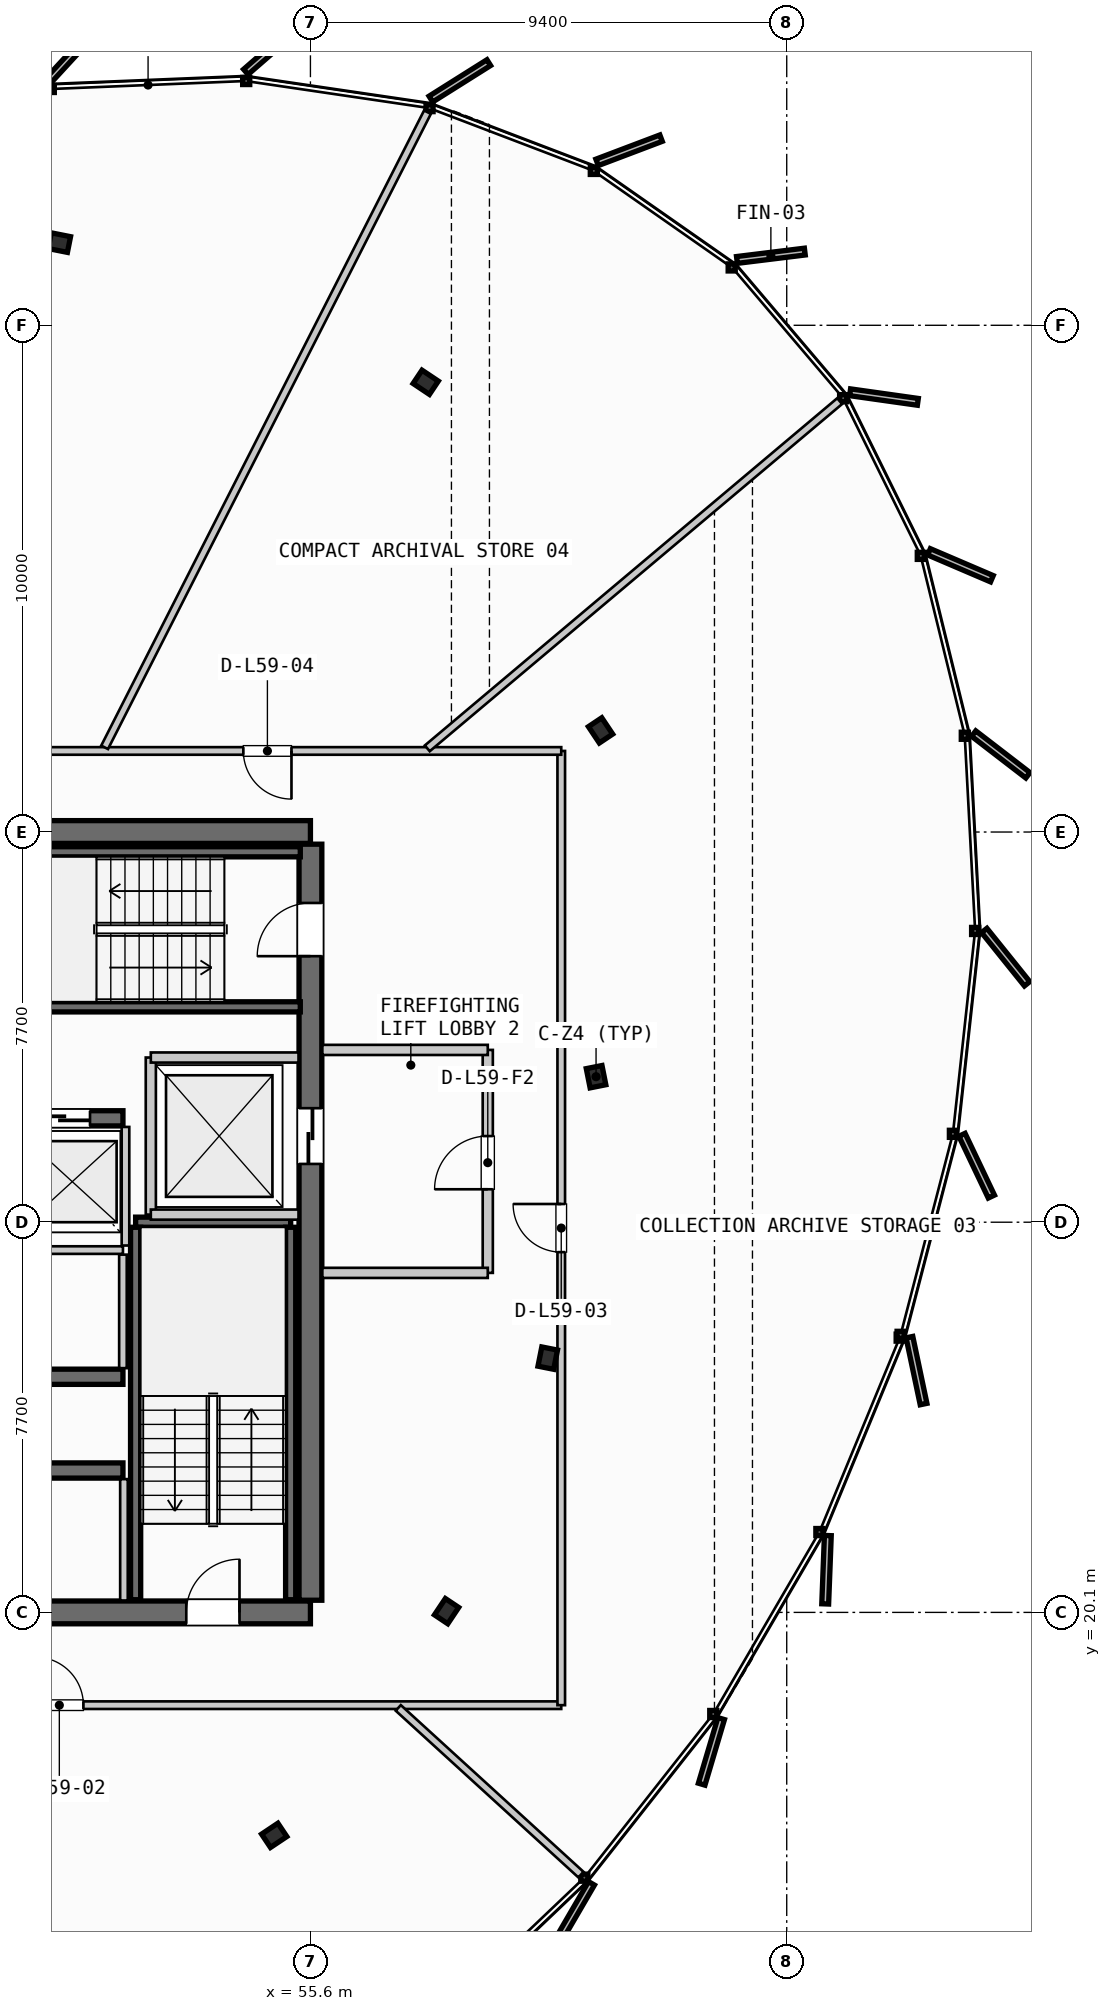
"""IFC4 building model, lengths in metres.
Left out: names, types, materials, properties, quantities, classifications, styles, units other than length and angle.
Written with IfcOpenShell. Run it as: python <this file> out.ifc"""

import sys

from ifc_helpers import new_model, si_unit, direction, frame, frame_2d, origin, origin_2d, place, context, subcontext, project, spatial, rectangle, i_section, extrude, source, transform, mapped, element, fill, save


model = new_model("IFC4")
c1 = context("Model", 3, precision=1e-05, world=origin(), true_north=direction((0.0, 1.0)))
c2 = subcontext(c1, "Body", "Model", "MODEL_VIEW")
j1 = project(units=[si_unit("LENGTHUNIT", "METRE"), si_unit("PLANEANGLEUNIT", "RADIAN")], contexts=[c1])
p1 = place(None, origin())
s1 = spatial("IfcSite", under=j1, at=p1, CompositionType="ELEMENT")
p2 = place(p1, origin())
s2 = spatial("IfcBuilding", under=s1, at=p2, CompositionType="ELEMENT")
p3 = place(p2, frame((0.0, 0.0, 228.4)))
s3 = spatial("IfcBuildingStorey", under=s2, at=p3, CompositionType="ELEMENT", Elevation=228.4)
p4 = place(p3, frame((38.0, 20.1, 0.0), z_axis=(0.0, 0.0, 1.0), x_axis=(1.0, 0.0, 0.0)))
e1 = element("IfcWall", 1, at=p4, inside=s3, PredefinedType="SHEAR", context=c2, shape_type="SweptSolid", body=[
    extrude(rectangle(XDim=17.6, YDim=0.45, at=frame_2d((8.8, 0.0))), origin(), (0.0, 0.0, 1.0), 3.21),
])
p5 = place(p4, frame((1.4, 0.0, 0.0)))
e2 = element("IfcOpeningElement", 2, at=p5, cuts=e1, PredefinedType="OPENING", context=c2, shape_type="SweptSolid", body=[
    extrude(rectangle(XDim=1.05, YDim=2.15, at=frame_2d((0.525, 1.075))), frame((0.0, 0.235, 0.0), z_axis=(0.0, -1.0, 0.0), x_axis=(1.0, 0.0, 0.0)), (0.0, 0.0, 1.0), 0.47),
])
p6 = place(p4, frame((15.15, 0.0, 0.0)))
e3 = element("IfcOpeningElement", 3, at=p6, cuts=e1, PredefinedType="OPENING", context=c2, shape_type="SweptSolid", body=[
    extrude(rectangle(XDim=1.05, YDim=2.15, at=frame_2d((0.525, 1.075))), frame((0.0, 0.235, 0.0), z_axis=(0.0, -1.0, 0.0), x_axis=(1.0, 0.0, 0.0)), (0.0, 0.0, 1.0), 0.47),
])
p7 = place(p4, frame((5.25, 0.0, 0.0)))
e4 = element("IfcOpeningElement", 4, at=p7, cuts=e1, PredefinedType="OPENING", context=c2, shape_type="SweptSolid", body=[
    extrude(rectangle(XDim=0.95, YDim=2.15, at=frame_2d((0.475, 1.075))), frame((0.0, 0.235, 0.0), z_axis=(0.0, -1.0, 0.0), x_axis=(1.0, 0.0, 0.0)), (0.0, 0.0, 1.0), 0.47),
])
p8 = place(p4, frame((11.4, 0.0, 0.0)))
e5 = element("IfcOpeningElement", 5, at=p8, cuts=e1, PredefinedType="OPENING", context=c2, shape_type="SweptSolid", body=[
    extrude(rectangle(XDim=0.95, YDim=2.15, at=frame_2d((0.475, 1.075))), frame((0.0, 0.235, 0.0), z_axis=(0.0, -1.0, 0.0), x_axis=(1.0, 0.0, 0.0)), (0.0, 0.0, 1.0), 0.47),
])
p9 = place(p3, frame((55.6, 35.5, 0.0), z_axis=(0.0, 0.0, 1.0), x_axis=(-1.0, 0.0, 0.0)))
e6 = element("IfcWall", 6, at=p9, inside=s3, PredefinedType="SHEAR", context=c2, shape_type="SweptSolid", body=[
    extrude(rectangle(XDim=17.6, YDim=0.45, at=frame_2d((8.8, 0.0))), origin(), (0.0, 0.0, 1.0), 3.21),
])
p10 = place(p9, frame((8.05, 0.0, 0.0)))
e7 = element("IfcOpeningElement", 7, at=p10, cuts=e6, PredefinedType="OPENING", context=c2, shape_type="SweptSolid", body=[
    extrude(rectangle(XDim=1.5, YDim=2.2, at=frame_2d((0.75, 1.1))), frame((0.0, 0.235, 0.0), z_axis=(0.0, -1.0, 0.0), x_axis=(1.0, 0.0, 0.0)), (0.0, 0.0, 1.0), 0.47),
])
p11 = place(p9, frame((15.1, 0.0, 0.0)))
e8 = element("IfcOpeningElement", 8, at=p11, cuts=e6, PredefinedType="OPENING", context=c2, shape_type="SweptSolid", body=[
    extrude(rectangle(XDim=0.95, YDim=2.15, at=frame_2d((0.475, 1.075))), frame((0.0, 0.235, 0.0), z_axis=(0.0, -1.0, 0.0), x_axis=(1.0, 0.0, 0.0)), (0.0, 0.0, 1.0), 0.47),
])
p12 = place(p9, frame((12.6, 0.0, 0.0)))
e9 = element("IfcOpeningElement", 9, at=p12, cuts=e6, PredefinedType="OPENING", context=c2, shape_type="SweptSolid", body=[
    extrude(rectangle(XDim=0.95, YDim=2.15, at=frame_2d((0.475, 1.075))), frame((0.0, 0.235, 0.0), z_axis=(0.0, -1.0, 0.0), x_axis=(1.0, 0.0, 0.0)), (0.0, 0.0, 1.0), 0.47),
])
p13 = place(p9, frame((10.45, 0.0, 0.0)))
e10 = element("IfcOpeningElement", 10, at=p13, cuts=e6, PredefinedType="OPENING", context=c2, shape_type="SweptSolid", body=[
    extrude(rectangle(XDim=0.95, YDim=2.15, at=frame_2d((0.475, 1.075))), frame((0.0, 0.235, 0.0), z_axis=(0.0, -1.0, 0.0), x_axis=(1.0, 0.0, 0.0)), (0.0, 0.0, 1.0), 0.47),
])
p14 = place(p3, frame((55.6, 20.34, 0.0), z_axis=(0.0, 0.0, 1.0), x_axis=(0.0, 1.0, 0.0)))
e11 = element("IfcWall", 11, at=p14, inside=s3, PredefinedType="SHEAR", context=c2, shape_type="SweptSolid", body=[
    extrude(rectangle(XDim=14.92, YDim=0.45, at=frame_2d((7.46, 0.0))), origin(), (0.0, 0.0, 1.0), 3.21),
])
p15 = place(p14, frame((12.71, 0.0, 0.0)))
e12 = element("IfcOpeningElement", 12, at=p15, cuts=e11, PredefinedType="OPENING", context=c2, shape_type="SweptSolid", body=[
    extrude(rectangle(XDim=1.05, YDim=2.15, at=frame_2d((0.525, 1.075))), frame((0.0, 0.235, 0.0), z_axis=(0.0, -1.0, 0.0), x_axis=(1.0, 0.0, 0.0)), (0.0, 0.0, 1.0), 0.47),
])
p16 = place(p14, frame((8.61, 0.0, 0.0)))
e13 = element("IfcOpeningElement", 13, at=p16, cuts=e11, PredefinedType="OPENING", context=c2, shape_type="SweptSolid", body=[
    extrude(rectangle(XDim=1.1, YDim=2.2, at=frame_2d((0.55, 1.1))), frame((0.0, 0.235, 0.0), z_axis=(0.0, -1.0, 0.0), x_axis=(1.0, 0.0, 0.0)), (0.0, 0.0, 1.0), 0.47),
])
p17 = place(p3, frame((47.65, 22.9, 0.0), z_axis=(0.0, 0.0, 1.0), x_axis=(1.0, 0.0, 0.0)))
e14 = element("IfcWall", 14, at=p17, inside=s3, PredefinedType="SHEAR", context=c2, shape_type="SweptSolid", body=[
    extrude(rectangle(XDim=4.25, YDim=0.3, at=frame_2d((2.125, 0.0))), origin(), (0.0, 0.0, 1.0), 3.21),
])
p18 = place(p3, frame((47.65, 24.75, 0.0), z_axis=(0.0, 0.0, 1.0), x_axis=(1.0, 0.0, 0.0)))
e15 = element("IfcWall", 15, at=p18, inside=s3, PredefinedType="SHEAR", context=c2, shape_type="SweptSolid", body=[
    extrude(rectangle(XDim=4.25, YDim=0.3, at=frame_2d((2.125, 0.0))), origin(), (0.0, 0.0, 1.0), 3.21),
])
p19 = place(p18, frame((1.55, 0.0, 0.0)))
e16 = element("IfcOpeningElement", 16, at=p19, cuts=e15, PredefinedType="OPENING", context=c2, shape_type="SweptSolid", body=[
    extrude(rectangle(XDim=0.95, YDim=2.15, at=frame_2d((0.475, 1.075))), frame((0.0, 0.16, 0.0), z_axis=(0.0, -1.0, 0.0), x_axis=(1.0, 0.0, 0.0)), (0.0, 0.0, 1.0), 0.32),
])
p20 = place(p3, frame((47.65, 29.85, 0.0), z_axis=(0.0, 0.0, 1.0), x_axis=(1.0, 0.0, 0.0)))
e17 = element("IfcWall", 17, at=p20, inside=s3, PredefinedType="SHEAR", context=c2, shape_type="SweptSolid", body=[
    extrude(rectangle(XDim=4.25, YDim=0.3, at=frame_2d((2.125, 0.0))), origin(), (0.0, 0.0, 1.0), 3.21),
])
p21 = place(p20, frame((0.45, 0.0, 0.0)))
e18 = element("IfcOpeningElement", 18, at=p21, cuts=e17, PredefinedType="OPENING", context=c2, shape_type="SweptSolid", body=[
    extrude(rectangle(XDim=1.1, YDim=2.2, at=frame_2d((0.55, 1.1))), frame((0.0, 0.16, 0.0), z_axis=(0.0, -1.0, 0.0), x_axis=(1.0, 0.0, 0.0)), (0.0, 0.0, 1.0), 0.32),
])
p22 = place(p20, frame((2.5, 0.0, 0.0)))
e19 = element("IfcOpeningElement", 19, at=p22, cuts=e17, PredefinedType="OPENING", context=c2, shape_type="SweptSolid", body=[
    extrude(rectangle(XDim=1.1, YDim=2.2, at=frame_2d((0.55, 1.1))), frame((0.0, 0.16, 0.0), z_axis=(0.0, -1.0, 0.0), x_axis=(1.0, 0.0, 0.0)), (0.0, 0.0, 1.0), 0.32),
])
m1 = source(origin(), c2, "Body", "SweptSolid", [
    extrude(i_section(OverallWidth=0.387, OverallDepth=0.316, WebThickness=0.019, FlangeThickness=0.028, FilletRadius=0.015, at=origin_2d()), origin(), (0.0, 0.0, 1.0), 3.21),
])
for number, where, z_axis, x_axis in (
    (20, (61.237, 30.672, 0.0), (0.0, 0.0, 1.0), (0.981, 0.195, 0.0)),
    (21, (61.326, 37.506, 0.0), (0.0, 0.0, 1.0), (0.831, 0.556, 0.0)),
    (22, (57.875, 44.375, 0.0), (0.0, 0.0, 1.0), (0.556, 0.831, 0.0)),
    (23, (50.645, 47.132, 0.0), (0.0, 0.0, 1.0), (0.195, 0.981, 0.0)),
    (24, (54.885, 15.7, 0.0), (0.0, 0.0, 1.0), (0.556, -0.831, 0.0)),
    (25, (58.287, 20.125, 0.0), (0.0, 0.0, 1.0), (0.831, -0.556, 0.0)),
    (26, (60.284, 25.118, 0.0), (0.0, 0.0, 1.0), (0.981, -0.195, 0.0)),
):
    element("IfcColumn", number, at=place(p3, frame(where, z_axis=z_axis, x_axis=x_axis)), inside=s3, PredefinedType="COLUMN", context=c2, shape_type="MappedRepresentation", body=[
        mapped(m1, transform((0.0, 0.0, 0.0), scale=1.0)),
    ])
p23 = place(p3, frame((52.15, 27.8, 0.0), z_axis=(0.0, 0.0, 1.0), x_axis=(1.0, 0.0, 0.0)))
e27 = element("IfcWall", 27, at=p23, inside=s3, PredefinedType="SHEAR", context=c2, shape_type="SweptSolid", body=[
    extrude(rectangle(XDim=3.06, YDim=0.2, at=frame_2d((1.53, 0.0))), origin(), (0.0, 0.0, 1.0), 3.21),
])
for number, where, z_axis, x_axis in (
    (28, (55.21, 27.7, 0.0), (0.0, 0.0, 1.0), (0.0, -1.0, 0.0)),
    (29, (52.15, 20.35, 0.0), (0.0, 0.0, 1.0), (0.0, 1.0, 0.0)),
    (30, (48.05, 35.11, 0.0), (0.0, 0.0, 1.0), (1.0, 0.0, 0.0)),
    (31, (55.4, 32.05, 0.0), (0.0, 0.0, 1.0), (-1.0, 0.0, 0.0)),
):
    element("IfcWall", number, at=place(p3, frame(where, z_axis=z_axis, x_axis=x_axis)), inside=s3, PredefinedType="SHEAR", context=c2, shape_type="SweptSolid", body=[
        extrude(rectangle(XDim=7.35, YDim=0.2, at=frame_2d((3.675, 0.0))), origin(), (0.0, 0.0, 1.0), 3.21),
    ])
p24 = place(p3, frame((52.45, 27.95, 0.0), z_axis=(0.0, 0.0, 1.0), x_axis=(0.0, 1.0, 0.0)))
e32 = element("IfcWall", 32, at=p24, inside=s3, PredefinedType="PARTITIONING", context=c2, shape_type="SweptSolid", body=[
    extrude(rectangle(XDim=3.1, YDim=0.2, at=frame_2d((1.55, 0.0))), origin(), (0.0, 0.0, 1.0), 2.28),
])
for number, where, z_axis, x_axis in (
    (33, (52.45, 27.95, 0.0), (0.0, 0.0, 1.0), (1.0, 0.0, 0.0)),
    (34, (52.45, 31.05, 0.0), (0.0, 0.0, 1.0), (1.0, 0.0, 0.0)),
):
    element("IfcWall", number, at=place(p3, frame(where, z_axis=z_axis, x_axis=x_axis)), inside=s3, PredefinedType="PARTITIONING", context=c2, shape_type="SweptSolid", body=[
        extrude(rectangle(XDim=2.915, YDim=0.2, at=frame_2d((1.458, 0.0))), origin(), (0.0, 0.0, 1.0), 2.28),
    ])
p25 = place(p3, frame((59.1, 26.8, 0.0), z_axis=(0.0, 0.0, 1.0), x_axis=(0.0, 1.0, 0.0)))
e35 = element("IfcWall", 35, at=p25, inside=s3, PredefinedType="PARTITIONING", context=c2, shape_type="SweptSolid", body=[
    extrude(rectangle(XDim=4.4, YDim=0.2, at=frame_2d((2.2, 0.0))), origin(), (0.0, 0.0, 1.0), 2.28),
])
p26 = place(p25, frame((1.65, 0.0, 0.0)))
e36 = element("IfcOpeningElement", 36, at=p26, cuts=e35, PredefinedType="OPENING", context=c2, shape_type="SweptSolid", body=[
    extrude(rectangle(XDim=1.05, YDim=2.15, at=frame_2d((0.525, 1.075))), frame((0.0, 0.11, 0.0), z_axis=(0.0, -1.0, 0.0), x_axis=(1.0, 0.0, 0.0)), (0.0, 0.0, 1.0), 0.22),
])
for number, where, z_axis, x_axis in (
    (37, (55.835, 26.8, 0.0), (0.0, 0.0, 1.0), (1.0, 0.0, 0.0)),
    (38, (55.835, 31.2, 0.0), (0.0, 0.0, 1.0), (1.0, 0.0, 0.0)),
):
    element("IfcWall", number, at=place(p3, frame(where, z_axis=z_axis, x_axis=x_axis)), inside=s3, PredefinedType="PARTITIONING", context=c2, shape_type="SweptSolid", body=[
        extrude(rectangle(XDim=3.265, YDim=0.2, at=frame_2d((1.633, 0.0))), origin(), (0.0, 0.0, 1.0), 2.28),
    ])
p27 = place(p3, frame((51.92, 20.335, 0.0), z_axis=(0.0, 0.0, 1.0), x_axis=(0.0, 1.0, 0.0)))
e39 = element("IfcWall", 39, at=p27, inside=s3, PredefinedType="PARTITIONING", context=c2, shape_type="SweptSolid", body=[
    extrude(rectangle(XDim=2.395, YDim=0.15, at=frame_2d((1.198, 0.0))), origin(), (0.0, 0.0, 1.0), 2.28),
])
p28 = place(p3, frame((47.65, 27.25, 0.0), z_axis=(0.0, 0.0, 1.0), x_axis=(1.0, 0.0, 0.0)))
e40 = element("IfcWall", 40, at=p28, inside=s3, PredefinedType="PARTITIONING", context=c2, shape_type="SweptSolid", body=[
    extrude(rectangle(XDim=4.25, YDim=0.15, at=frame_2d((2.125, 0.0))), origin(), (0.0, 0.0, 1.0), 2.28),
])
p29 = place(p3, frame((51.9, 24.92, 0.0), z_axis=(0.0, 0.0, 1.0), x_axis=(0.0, 1.0, 0.0)))
e41 = element("IfcWall", 41, at=p29, inside=s3, PredefinedType="PARTITIONING", context=c2, shape_type="SweptSolid", body=[
    extrude(rectangle(XDim=2.24, YDim=0.15, at=frame_2d((1.12, 0.0))), origin(), (0.0, 0.0, 1.0), 2.28),
])
p30 = place(p3, frame((51.95, 27.34, 0.0), z_axis=(0.0, 0.0, 1.0), x_axis=(0.0, 1.0, 0.0)))
e42 = element("IfcWall", 42, at=p30, inside=s3, PredefinedType="PARTITIONING", context=c2, shape_type="SweptSolid", body=[
    extrude(rectangle(XDim=2.34, YDim=0.15, at=frame_2d((1.17, 0.0))), origin(), (0.0, 0.0, 1.0), 2.28),
])
p31 = place(p3, frame((31.68, 18.269, 0.0), z_axis=(0.0, 0.0, 1.0), x_axis=(1.0, 0.0, 0.0)))
e43 = element("IfcWall", 43, at=p31, inside=s3, PredefinedType="PARTITIONING", context=c2, shape_type="SweptSolid", body=[
    extrude(rectangle(XDim=28.87, YDim=0.15, at=frame_2d((14.435, 0.0))), origin(), (0.0, 0.0, 1.0), 2.28),
])
p32 = place(p31, frame((7.324, 0.0, 0.0)))
e44 = element("IfcOpeningElement", 44, at=p32, cuts=e43, PredefinedType="OPENING", context=c2, shape_type="SweptSolid", body=[
    extrude(rectangle(XDim=0.95, YDim=2.15, at=frame_2d((0.475, 1.075))), frame((0.0, 0.085, 0.0), z_axis=(0.0, -1.0, 0.0), x_axis=(1.0, 0.0, 0.0)), (0.0, 0.0, 1.0), 0.17),
])
p33 = place(p31, frame((18.49, 0.0, 0.0)))
e45 = element("IfcOpeningElement", 45, at=p33, cuts=e43, PredefinedType="OPENING", context=c2, shape_type="SweptSolid", body=[
    extrude(rectangle(XDim=0.95, YDim=2.15, at=frame_2d((0.475, 1.075))), frame((0.0, 0.085, 0.0), z_axis=(0.0, -1.0, 0.0), x_axis=(1.0, 0.0, 0.0)), (0.0, 0.0, 1.0), 0.17),
])
p34 = place(p3, frame((60.55, 18.269, 0.0), z_axis=(0.0, 0.0, 1.0), x_axis=(0.0, 1.0, 0.0)))
e46 = element("IfcWall", 46, at=p34, inside=s3, PredefinedType="PARTITIONING", context=c2, shape_type="SweptSolid", body=[
    extrude(rectangle(XDim=18.831, YDim=0.15, at=frame_2d((9.416, 0.0))), origin(), (0.0, 0.0, 1.0), 2.28),
])
p35 = place(p34, frame((8.94, 0.0, 0.0)))
e47 = element("IfcOpeningElement", 47, at=p35, cuts=e46, PredefinedType="OPENING", context=c2, shape_type="SweptSolid", body=[
    extrude(rectangle(XDim=0.95, YDim=2.15, at=frame_2d((0.475, 1.075))), frame((0.0, 0.085, 0.0), z_axis=(0.0, -1.0, 0.0), x_axis=(1.0, 0.0, 0.0)), (0.0, 0.0, 1.0), 0.17),
])
p36 = place(p3, frame((60.55, 37.1, 0.0), z_axis=(0.0, 0.0, 1.0), x_axis=(-1.0, 0.0, 0.0)))
e48 = element("IfcWall", 48, at=p36, inside=s3, PredefinedType="PARTITIONING", context=c2, shape_type="SweptSolid", body=[
    extrude(rectangle(XDim=28.87, YDim=0.15, at=frame_2d((14.435, 0.0))), origin(), (0.0, 0.0, 1.0), 2.28),
])
p37 = place(p36, frame((5.324, 0.0, 0.0)))
e49 = element("IfcOpeningElement", 49, at=p37, cuts=e48, PredefinedType="OPENING", context=c2, shape_type="SweptSolid", body=[
    extrude(rectangle(XDim=0.95, YDim=2.15, at=frame_2d((0.475, 1.075))), frame((0.0, 0.085, 0.0), z_axis=(0.0, -1.0, 0.0), x_axis=(1.0, 0.0, 0.0)), (0.0, 0.0, 1.0), 0.17),
])
p38 = place(p36, frame((12.932, 0.0, 0.0)))
e50 = element("IfcOpeningElement", 50, at=p38, cuts=e48, PredefinedType="OPENING", context=c2, shape_type="SweptSolid", body=[
    extrude(rectangle(XDim=0.95, YDim=2.15, at=frame_2d((0.475, 1.075))), frame((0.0, 0.085, 0.0), z_axis=(0.0, -1.0, 0.0), x_axis=(1.0, 0.0, 0.0)), (0.0, 0.0, 1.0), 0.17),
])
p39 = place(p36, frame((22.557, 0.0, 0.0)))
e51 = element("IfcOpeningElement", 51, at=p39, cuts=e48, PredefinedType="OPENING", context=c2, shape_type="SweptSolid", body=[
    extrude(rectangle(XDim=0.95, YDim=2.15, at=frame_2d((0.475, 1.075))), frame((0.0, 0.085, 0.0), z_axis=(0.0, -1.0, 0.0), x_axis=(1.0, 0.0, 0.0)), (0.0, 0.0, 1.0), 0.17),
])
p40 = place(p3, frame((57.333, 18.215, 0.0), z_axis=(0.0, 0.0, 1.0), x_axis=(0.738680382418, -0.674055852753, 0.0)))
e52 = element("IfcWall", 52, at=p40, inside=s3, PredefinedType="PARTITIONING", context=c2, shape_type="SweptSolid", body=[
    extrude(rectangle(XDim=4.881, YDim=0.15, at=frame_2d((2.44, 0.0))), origin(), (0.0, 0.0, 1.0), 2.28),
])
p41 = place(p3, frame((57.906, 37.152, 0.0), z_axis=(0.0, 0.0, 1.0), x_axis=(0.764985580115, 0.644047406808, 0.0)))
e53 = element("IfcWall", 53, at=p41, inside=s3, PredefinedType="PARTITIONING", context=c2, shape_type="SweptSolid", body=[
    extrude(rectangle(XDim=10.639, YDim=0.15, at=frame_2d((5.319, 0.0))), origin(), (0.0, 0.0, 1.0), 2.28),
])
p42 = place(p3, frame((51.538, 37.171, 0.0), z_axis=(0.0, 0.0, 1.0), x_axis=(0.453155713702, 0.891431376573, 0.0)))
e54 = element("IfcWall", 54, at=p42, inside=s3, PredefinedType="PARTITIONING", context=c2, shape_type="SweptSolid", body=[
    extrude(rectangle(XDim=14.061, YDim=0.15, at=frame_2d((7.031, 0.0))), origin(), (0.0, 0.0, 1.0), 2.28),
])
m2 = source(origin(), c2, "Body", "SweptSolid", [
    extrude(rectangle(XDim=1.05, YDim=2.15, at=frame_2d((0.525, 1.075))), frame((0.0, 0.025, 0.0), z_axis=(0.0, -1.0, 0.0), x_axis=(1.0, 0.0, 0.0)), (0.0, 0.0, 1.0), 0.05),
])
p43 = place(p6, origin())
e55 = element("IfcDoor", 55, at=p43, inside=s3, OperationType="SINGLE_SWING_RIGHT", PredefinedType="DOOR", context=c2, shape_type="MappedRepresentation", body=[
    mapped(m2, transform((0.0, 0.0, 0.0), scale=1.0)),
])
fill(e3, e55)
p44 = place(p15, origin())
e56 = element("IfcDoor", 56, at=p44, inside=s3, OperationType="SINGLE_SWING_LEFT", PredefinedType="DOOR", context=c2, shape_type="MappedRepresentation", body=[
    mapped(m2, transform((0.0, 0.0, 0.0), scale=1.0)),
])
fill(e12, e56)
m3 = source(origin(), c2, "Body", "SweptSolid", [
    extrude(rectangle(XDim=1.1, YDim=2.2, at=frame_2d((0.55, 1.1))), frame((0.0, 0.025, 0.0), z_axis=(0.0, -1.0, 0.0), x_axis=(1.0, 0.0, 0.0)), (0.0, 0.0, 1.0), 0.05),
])
p45 = place(p16, origin())
e57 = element("IfcDoor", 57, at=p45, inside=s3, OperationType="SLIDING_TO_RIGHT", PredefinedType="DOOR", context=c2, shape_type="MappedRepresentation", body=[
    mapped(m3, transform((0.0, 0.0, 0.0), scale=1.0)),
])
fill(e13, e57)
p46 = place(p22, origin())
e58 = element("IfcDoor", 58, at=p46, inside=s3, OperationType="SLIDING_TO_LEFT", PredefinedType="DOOR", context=c2, shape_type="MappedRepresentation", body=[
    mapped(m3, transform((0.0, 0.0, 0.0), scale=1.0)),
])
fill(e19, e58)
p47 = place(p26, origin())
e59 = element("IfcDoor", 59, at=p47, inside=s3, OperationType="SINGLE_SWING_LEFT", PredefinedType="DOOR", context=c2, shape_type="MappedRepresentation", body=[
    mapped(m2, transform((0.0, 0.0, 0.0), scale=1.0)),
])
fill(e36, e59)
m4 = source(origin(), c2, "Body", "SweptSolid", [
    extrude(rectangle(XDim=0.95, YDim=2.15, at=frame_2d((0.475, 1.075))), frame((0.0, 0.025, 0.0), z_axis=(0.0, -1.0, 0.0), x_axis=(1.0, 0.0, 0.0)), (0.0, 0.0, 1.0), 0.05),
])
p48 = place(p33, origin())
e60 = element("IfcDoor", 60, at=p48, inside=s3, OperationType="SINGLE_SWING_LEFT", PredefinedType="DOOR", context=c2, shape_type="MappedRepresentation", body=[
    mapped(m4, transform((0.0, 0.0, 0.0), scale=1.0)),
])
fill(e45, e60)
p49 = place(p35, origin())
e61 = element("IfcDoor", 61, at=p49, inside=s3, OperationType="SINGLE_SWING_RIGHT", PredefinedType="DOOR", context=c2, shape_type="MappedRepresentation", body=[
    mapped(m4, transform((0.0, 0.0, 0.0), scale=1.0)),
])
fill(e47, e61)
p50 = place(p37, origin())
e62 = element("IfcDoor", 62, at=p50, inside=s3, OperationType="SINGLE_SWING_LEFT", PredefinedType="DOOR", context=c2, shape_type="MappedRepresentation", body=[
    mapped(m4, transform((0.0, 0.0, 0.0), scale=1.0)),
])
fill(e49, e62)
save(model, sys.argv[1])
